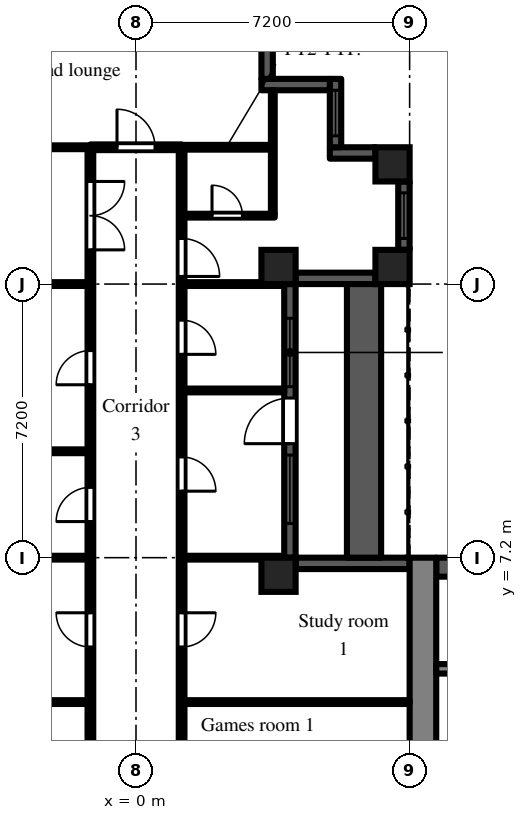
"""IFC4 building model, lengths in metres.
Left out: names, types, materials, properties, quantities, classifications, styles, units other than length and angle.
Written with IfcOpenShell. Run it as: python <this file> out.ifc"""

import sys

from ifc_helpers import new_model, si_unit, direction, frame, frame_2d, origin, origin_2d, place, context, subcontext, project, spatial, rectangle, extrude, element, fill, save


model = new_model("IFC4")
c1 = context("Model", 3, precision=1e-05, world=origin(), true_north=direction((0.0, 1.0)))
c2 = subcontext(c1, "Body", "Model", "MODEL_VIEW")
j1 = project(units=[si_unit("LENGTHUNIT", "METRE"), si_unit("PLANEANGLEUNIT", "RADIAN")], contexts=[c1])
p1 = place(None, origin())
s1 = spatial("IfcSite", under=j1, at=p1, CompositionType="ELEMENT")
p2 = place(p1, origin())
s2 = spatial("IfcBuilding", under=s1, at=p2, CompositionType="ELEMENT")
p3 = place(p2, frame((0.0, 0.0, 102.9)))
s3 = spatial("IfcBuildingStorey", under=s2, at=p3, CompositionType="ELEMENT", Elevation=102.9)
for number, where, z_axis, x_axis in (
    (1, (3.75, 6.75, 0.0), (0.0, 0.0, 1.0), (1.0, 0.0, 0.0)),
    (2, (3.75, 14.85, 0.0), (0.0, 0.0, 1.0), (1.0, 0.0, 0.0)),
    (3, (6.75, 14.85, 0.0), (0.0, 0.0, 1.0), (1.0, 0.0, 0.0)),
    (4, (6.75, 17.55, 0.0), (0.0, 0.0, 1.0), (1.0, 0.0, 0.0)),
):
    element("IfcColumn", number, at=place(p3, frame(where, z_axis=z_axis, x_axis=x_axis)), inside=s3, PredefinedType="COLUMN", context=c2, shape_type="SweptSolid", body=[
        extrude(rectangle(XDim=0.9, YDim=0.9, at=origin_2d()), origin(), (0.0, 0.0, 1.0), 3.0),
    ])
p4 = place(p3, frame((7.2, 7.05, 0.0), z_axis=(0.0, 0.0, 1.0), x_axis=(-1.0, 0.0, 0.0)))
e5 = element("IfcWall", 5, at=p4, inside=s3, PredefinedType="SOLIDWALL", context=c2, shape_type="SweptSolid", body=[
    extrude(rectangle(XDim=3.0, YDim=0.3, at=frame_2d((1.5, 0.0))), origin(), (0.0, 0.0, 1.0), 2.1),
])
p5 = place(p3, frame((4.05, 7.2, 0.0), z_axis=(0.0, 0.0, 1.0), x_axis=(0.0, 1.0, 0.0)))
e6 = element("IfcWall", 6, at=p5, inside=s3, PredefinedType="SOLIDWALL", context=c2, shape_type="SweptSolid", body=[
    extrude(rectangle(XDim=7.2, YDim=0.3, at=frame_2d((3.6, 0.0))), origin(), (0.0, 0.0, 1.0), 2.1),
])
p6 = place(p5, frame((3.0, 0.0, 0.0)))
e7 = element("IfcOpeningElement", 7, at=p6, cuts=e6, PredefinedType="OPENING", context=c2, shape_type="SweptSolid", body=[
    extrude(rectangle(XDim=1.2, YDim=2.05, at=frame_2d((0.6, 1.025))), frame((0.0, 0.16, 0.0), z_axis=(0.0, -1.0, 0.0), x_axis=(1.0, 0.0, 0.0)), (0.0, 0.0, 1.0), 0.32),
])
p7 = place(p5, frame((0.9, 0.0, 0.2)))
e8 = element("IfcOpeningElement", 8, at=p7, cuts=e6, PredefinedType="OPENING", context=c2, shape_type="SweptSolid", body=[
    extrude(rectangle(XDim=1.8, YDim=1.85, at=frame_2d((0.9, 0.925))), frame((0.0, 0.16, 0.0), z_axis=(0.0, -1.0, 0.0), x_axis=(1.0, 0.0, 0.0)), (0.0, 0.0, 1.0), 0.32),
])
p8 = place(p5, frame((4.5, 0.0, 0.2)))
e9 = element("IfcOpeningElement", 9, at=p8, cuts=e6, PredefinedType="OPENING", context=c2, shape_type="SweptSolid", body=[
    extrude(rectangle(XDim=1.8, YDim=1.85, at=frame_2d((0.9, 0.925))), frame((0.0, 0.16, 0.0), z_axis=(0.0, -1.0, 0.0), x_axis=(1.0, 0.0, 0.0)), (0.0, 0.0, 1.0), 0.32),
])
p9 = place(p3, frame((4.2, 14.55, 0.0), z_axis=(0.0, 0.0, 1.0), x_axis=(1.0, 0.0, 0.0)))
e10 = element("IfcWall", 10, at=p9, inside=s3, PredefinedType="SOLIDWALL", context=c2, shape_type="SweptSolid", body=[
    extrude(rectangle(XDim=2.1, YDim=0.3, at=frame_2d((1.05, 0.0))), origin(), (0.0, 0.0, 1.0), 2.1),
])
p10 = place(p3, frame((7.05, 15.3, 0.0), z_axis=(0.0, 0.0, 1.0), x_axis=(0.0, 1.0, 0.0)))
e11 = element("IfcWall", 11, at=p10, inside=s3, PredefinedType="SOLIDWALL", context=c2, shape_type="SweptSolid", body=[
    extrude(rectangle(XDim=1.8, YDim=0.3, at=frame_2d((0.9, 0.0))), origin(), (0.0, 0.0, 1.0), 2.1),
])
p11 = place(p10, frame((0.3, 0.0, 0.2)))
e12 = element("IfcOpeningElement", 12, at=p11, cuts=e11, PredefinedType="OPENING", context=c2, shape_type="SweptSolid", body=[
    extrude(rectangle(XDim=1.2, YDim=1.85, at=frame_2d((0.6, 0.925))), frame((0.0, 0.16, 0.0), z_axis=(0.0, -1.0, 0.0), x_axis=(1.0, 0.0, 0.0)), (0.0, 0.0, 1.0), 0.32),
])
p12 = place(p3, frame((6.3, 17.85, 0.0), z_axis=(0.0, 0.0, 1.0), x_axis=(-1.0, 0.0, 0.0)))
e13 = element("IfcWall", 13, at=p12, inside=s3, PredefinedType="SOLIDWALL", context=c2, shape_type="SweptSolid", body=[
    extrude(rectangle(XDim=1.2, YDim=0.3, at=frame_2d((0.6, 0.0))), origin(), (0.0, 0.0, 1.0), 2.575),
])
p13 = place(p3, frame((5.25, 18.0, 0.0), z_axis=(0.0, 0.0, 1.0), x_axis=(0.0, 1.0, 0.0)))
e14 = element("IfcWall", 14, at=p13, inside=s3, PredefinedType="SOLIDWALL", context=c2, shape_type="SweptSolid", body=[
    extrude(rectangle(XDim=1.8, YDim=0.3, at=frame_2d((0.9, 0.0))), origin(), (0.0, 0.0, 1.0), 2.575),
])
p14 = place(p13, frame((0.3, 0.0, 0.2)))
e15 = element("IfcOpeningElement", 15, at=p14, cuts=e14, PredefinedType="OPENING", context=c2, shape_type="SweptSolid", body=[
    extrude(rectangle(XDim=1.2, YDim=1.85, at=frame_2d((0.6, 0.925))), frame((0.0, 0.16, 0.0), z_axis=(0.0, -1.0, 0.0), x_axis=(1.0, 0.0, 0.0)), (0.0, 0.0, 1.0), 0.32),
])
p15 = place(p3, frame((5.1, 19.65, 0.0), z_axis=(0.0, 0.0, 1.0), x_axis=(-1.0, 0.0, 0.0)))
e16 = element("IfcWall", 16, at=p15, inside=s3, PredefinedType="SOLIDWALL", context=c2, shape_type="SweptSolid", body=[
    extrude(rectangle(XDim=1.8, YDim=0.3, at=frame_2d((0.9, 0.0))), origin(), (0.0, 0.0, 1.0), 2.575),
])
p16 = place(p3, frame((3.45, 19.8, 0.0), z_axis=(0.0, 0.0, 1.0), x_axis=(0.0, 1.0, 0.0)))
e17 = element("IfcWall", 17, at=p16, inside=s3, PredefinedType="SOLIDWALL", context=c2, shape_type="SweptSolid", body=[
    extrude(rectangle(XDim=0.9, YDim=0.3, at=frame_2d((0.45, 0.0))), origin(), (0.0, 0.0, 1.0), 2.575),
])
p17 = place(p3, frame((6.0, 7.2, 0.0), z_axis=(0.0, 0.0, 1.0), x_axis=(0.0, 1.0, 0.0)))
e18 = element("IfcWall", 18, at=p17, inside=s3, PredefinedType="PARAPET", context=c2, shape_type="SweptSolid", body=[
    extrude(rectangle(XDim=7.2, YDim=0.9, at=frame_2d((3.6, 0.0))), origin(), (0.0, 0.0, 1.0), 0.8),
])
p18 = place(p3, frame((7.55, -7.2, 0.0), z_axis=(0.0, 0.0, 1.0), x_axis=(0.0, 1.0, 0.0)))
e19 = element("IfcWall", 19, at=p18, inside=s3, PredefinedType="SHEAR", context=c2, shape_type="SweptSolid", body=[
    extrude(rectangle(XDim=14.4, YDim=0.7, at=frame_2d((7.2, 0.0))), origin(), (0.0, 0.0, 1.0), 2.575),
])
p19 = place(p18, frame((6.0, 0.0, 0.0)))
e20 = element("IfcOpeningElement", 20, at=p19, cuts=e19, PredefinedType="OPENING", context=c2, shape_type="SweptSolid", body=[
    extrude(rectangle(XDim=2.4, YDim=2.2, at=frame_2d((1.2, 1.1))), frame((0.0, 0.36, 0.0), z_axis=(0.0, -1.0, 0.0), x_axis=(1.0, 0.0, 0.0)), (0.0, 0.0, 1.0), 0.72),
])
p20 = place(p3, frame((7.9, 6.95, 0.0), z_axis=(0.0, 0.0, 1.0), x_axis=(1.0, 0.0, 0.0)))
e21 = element("IfcWall", 21, at=p20, inside=s3, PredefinedType="SHEAR", context=c2, shape_type="SweptSolid", body=[
    extrude(rectangle(XDim=12.95, YDim=0.5, at=frame_2d((6.475, 0.0))), origin(), (0.0, 0.0, 1.0), 2.575),
])
p21 = place(p3, frame((7.9, 4.275, 0.0), z_axis=(0.0, 0.0, 1.0), x_axis=(1.0, 0.0, 0.0)))
e22 = element("IfcWall", 22, at=p21, inside=s3, PredefinedType="SHEAR", context=c2, shape_type="SweptSolid", body=[
    extrude(rectangle(XDim=1.95, YDim=0.25, at=frame_2d((0.975, 0.0))), origin(), (0.0, 0.0, 1.0), 2.575),
])
p22 = place(p3, frame((-7.2, 3.4, 0.0), z_axis=(0.0, 0.0, 1.0), x_axis=(1.0, 0.0, 0.0)))
e23 = element("IfcWall", 23, at=p22, inside=s3, PredefinedType="PARTITIONING", context=c2, shape_type="SweptSolid", body=[
    extrude(rectangle(XDim=5.925, YDim=0.1, at=frame_2d((2.962, 0.0))), origin(), (0.0, 0.0, 1.0), 2.575),
])
for number, where, z_axis, x_axis in (
    (24, (-3.9, 7.2, 0.0), (0.0, 0.0, 1.0), (1.0, 0.0, 0.0)),
    (25, (-3.9, 10.0, 0.0), (0.0, 0.0, 1.0), (1.0, 0.0, 0.0)),
    (26, (-3.9, 14.4, 0.0), (0.0, 0.0, 1.0), (1.0, 0.0, 0.0)),
):
    element("IfcWall", number, at=place(p3, frame(where, z_axis=z_axis, x_axis=x_axis)), inside=s3, PredefinedType="PARTITIONING", context=c2, shape_type="SweptSolid", body=[
        extrude(rectangle(XDim=2.625, YDim=0.1, at=frame_2d((1.312, 0.0))), origin(), (0.0, 0.0, 1.0), 2.575),
    ])
p23 = place(p3, frame((-3.55, 18.0, 0.0), z_axis=(0.0, 0.0, 1.0), x_axis=(1.0, 0.0, 0.0)))
e27 = element("IfcWall", 27, at=p23, inside=s3, PredefinedType="PARTITIONING", context=c2, shape_type="SweptSolid", body=[
    extrude(rectangle(XDim=2.35, YDim=0.1, at=frame_2d((1.175, 0.0))), origin(), (0.0, 0.0, 1.0), 2.575),
])
p24 = place(p3, frame((-1.2, 1.275, 0.0), z_axis=(0.0, 0.0, 1.0), x_axis=(0.0, 1.0, 0.0)))
e28 = element("IfcWall", 28, at=p24, inside=s3, PredefinedType="PARTITIONING", context=c2, shape_type="SweptSolid", body=[
    extrude(rectangle(XDim=16.65, YDim=0.15, at=frame_2d((8.325, 0.0))), origin(), (0.0, 0.0, 1.0), 2.575),
])
p25 = place(p24, frame((3.575, 0.0, 0.0)))
e29 = element("IfcOpeningElement", 29, at=p25, cuts=e28, PredefinedType="OPENING", context=c2, shape_type="SweptSolid", body=[
    extrude(rectangle(XDim=0.9, YDim=2.1, at=frame_2d((0.45, 1.05))), frame((0.0, 0.085, 0.0), z_axis=(0.0, -1.0, 0.0), x_axis=(1.0, 0.0, 0.0)), (0.0, 0.0, 1.0), 0.17),
])
p26 = place(p24, frame((6.875, 0.0, 0.0)))
e30 = element("IfcOpeningElement", 30, at=p26, cuts=e28, PredefinedType="OPENING", context=c2, shape_type="SweptSolid", body=[
    extrude(rectangle(XDim=0.9, YDim=2.1, at=frame_2d((0.45, 1.05))), frame((0.0, 0.085, 0.0), z_axis=(0.0, -1.0, 0.0), x_axis=(1.0, 0.0, 0.0)), (0.0, 0.0, 1.0), 0.17),
])
p27 = place(p24, frame((10.475, 0.0, 0.0)))
e31 = element("IfcOpeningElement", 31, at=p27, cuts=e28, PredefinedType="OPENING", context=c2, shape_type="SweptSolid", body=[
    extrude(rectangle(XDim=0.9, YDim=2.1, at=frame_2d((0.45, 1.05))), frame((0.0, 0.085, 0.0), z_axis=(0.0, -1.0, 0.0), x_axis=(1.0, 0.0, 0.0)), (0.0, 0.0, 1.0), 0.17),
])
p28 = place(p24, frame((14.025, 0.0, 0.0)))
e32 = element("IfcOpeningElement", 32, at=p28, cuts=e28, PredefinedType="OPENING", context=c2, shape_type="SweptSolid", body=[
    extrude(rectangle(XDim=1.8, YDim=2.1, at=frame_2d((0.9, 1.05))), frame((0.0, 0.085, 0.0), z_axis=(0.0, -1.0, 0.0), x_axis=(1.0, 0.0, 0.0)), (0.0, 0.0, 1.0), 0.17),
])
p29 = place(p3, frame((-1.2, 18.0, 0.0), z_axis=(0.0, 0.0, 1.0), x_axis=(1.0, 0.0, 0.0)))
e33 = element("IfcWall", 33, at=p29, inside=s3, PredefinedType="PARTITIONING", context=c2, shape_type="SweptSolid", body=[
    extrude(rectangle(XDim=2.4, YDim=0.15, at=frame_2d((1.2, 0.0))), origin(), (0.0, 0.0, 1.0), 2.575),
])
p30 = place(p29, frame((0.7, 0.0, 0.0)))
e34 = element("IfcOpeningElement", 34, at=p30, cuts=e33, PredefinedType="OPENING", context=c2, shape_type="SweptSolid", body=[
    extrude(rectangle(XDim=1.0, YDim=2.1, at=frame_2d((0.5, 1.05))), frame((0.0, 0.085, 0.0), z_axis=(0.0, -1.0, 0.0), x_axis=(1.0, 0.0, 0.0)), (0.0, 0.0, 1.0), 0.17),
])
p31 = place(p3, frame((1.2, 1.125, 0.0), z_axis=(0.0, 0.0, 1.0), x_axis=(0.0, 1.0, 0.0)))
e35 = element("IfcWall", 35, at=p31, inside=s3, PredefinedType="PARTITIONING", context=c2, shape_type="SweptSolid", body=[
    extrude(rectangle(XDim=16.8, YDim=0.15, at=frame_2d((8.4, 0.0))), origin(), (0.0, 0.0, 1.0), 2.575),
])
p32 = place(p31, frame((3.725, 0.0, 0.0)))
e36 = element("IfcOpeningElement", 36, at=p32, cuts=e35, PredefinedType="OPENING", context=c2, shape_type="SweptSolid", body=[
    extrude(rectangle(XDim=0.9, YDim=2.1, at=frame_2d((0.45, 1.05))), frame((0.0, 0.085, 0.0), z_axis=(0.0, -1.0, 0.0), x_axis=(1.0, 0.0, 0.0)), (0.0, 0.0, 1.0), 0.17),
])
p33 = place(p31, frame((11.425, 0.0, 0.0)))
e37 = element("IfcOpeningElement", 37, at=p33, cuts=e35, PredefinedType="OPENING", context=c2, shape_type="SweptSolid", body=[
    extrude(rectangle(XDim=0.9, YDim=2.1, at=frame_2d((0.45, 1.05))), frame((0.0, 0.085, 0.0), z_axis=(0.0, -1.0, 0.0), x_axis=(1.0, 0.0, 0.0)), (0.0, 0.0, 1.0), 0.17),
])
p34 = place(p31, frame((7.825, 0.0, 0.0)))
e38 = element("IfcOpeningElement", 38, at=p34, cuts=e35, PredefinedType="OPENING", context=c2, shape_type="SweptSolid", body=[
    extrude(rectangle(XDim=0.9, YDim=2.1, at=frame_2d((0.45, 1.05))), frame((0.0, 0.085, 0.0), z_axis=(0.0, -1.0, 0.0), x_axis=(1.0, 0.0, 0.0)), (0.0, 0.0, 1.0), 0.17),
])
p35 = place(p31, frame((13.475, 0.0, 0.0)))
e39 = element("IfcOpeningElement", 39, at=p35, cuts=e35, PredefinedType="OPENING", context=c2, shape_type="SweptSolid", body=[
    extrude(rectangle(XDim=1.0, YDim=2.1, at=frame_2d((0.5, 1.05))), frame((0.0, 0.085, 0.0), z_axis=(0.0, -1.0, 0.0), x_axis=(1.0, 0.0, 0.0)), (0.0, 0.0, 1.0), 0.17),
])
p36 = place(p3, frame((1.275, 3.4, 0.0), z_axis=(0.0, 0.0, 1.0), x_axis=(1.0, 0.0, 0.0)))
e40 = element("IfcWall", 40, at=p36, inside=s3, PredefinedType="PARTITIONING", context=c2, shape_type="SweptSolid", body=[
    extrude(rectangle(XDim=5.925, YDim=0.1, at=frame_2d((2.962, 0.0))), origin(), (0.0, 0.0, 1.0), 2.575),
])
for number, where, z_axis, x_axis in (
    (41, (1.275, 7.2, 0.0), (0.0, 0.0, 1.0), (1.0, 0.0, 0.0)),
    (42, (1.275, 11.6, 0.0), (0.0, 0.0, 1.0), (1.0, 0.0, 0.0)),
    (43, (1.275, 14.4, 0.0), (0.0, 0.0, 1.0), (1.0, 0.0, 0.0)),
):
    element("IfcWall", number, at=place(p3, frame(where, z_axis=z_axis, x_axis=x_axis)), inside=s3, PredefinedType="PARTITIONING", context=c2, shape_type="SweptSolid", body=[
        extrude(rectangle(XDim=2.625, YDim=0.1, at=frame_2d((1.312, 0.0))), origin(), (0.0, 0.0, 1.0), 2.575),
    ])
p37 = place(p3, frame((1.275, 16.2, 0.0), z_axis=(0.0, 0.0, 1.0), x_axis=(1.0, 0.0, 0.0)))
e44 = element("IfcWall", 44, at=p37, inside=s3, PredefinedType="PARTITIONING", context=c2, shape_type="SweptSolid", body=[
    extrude(rectangle(XDim=2.375, YDim=0.1, at=frame_2d((1.188, 0.0))), origin(), (0.0, 0.0, 1.0), 2.575),
])
p38 = place(p37, frame((0.725, 0.0, 0.0)))
e45 = element("IfcOpeningElement", 45, at=p38, cuts=e44, PredefinedType="OPENING", context=c2, shape_type="SweptSolid", body=[
    extrude(rectangle(XDim=0.8, YDim=2.1, at=frame_2d((0.4, 1.05))), frame((0.0, 0.06, 0.0), z_axis=(0.0, -1.0, 0.0), x_axis=(1.0, 0.0, 0.0)), (0.0, 0.0, 1.0), 0.12),
])
p39 = place(p3, frame((1.2, 18.0, 0.0), z_axis=(0.0, 0.0, 1.0), x_axis=(1.0, 0.0, 0.0)))
e46 = element("IfcWall", 46, at=p39, inside=s3, PredefinedType="PARTITIONING", context=c2, shape_type="SweptSolid", body=[
    extrude(rectangle(XDim=2.35, YDim=0.125, at=frame_2d((1.175, 0.0))), origin(), (0.0, 0.0, 1.0), 2.575),
])
p40 = place(p3, frame((3.6, 16.25, 0.0), z_axis=(0.0, 0.0, 1.0), x_axis=(0.0, 1.0, 0.0)))
e47 = element("IfcWall", 47, at=p40, inside=s3, PredefinedType="PARTITIONING", context=c2, shape_type="SweptSolid", body=[
    extrude(rectangle(XDim=3.25, YDim=0.1, at=frame_2d((1.625, 0.0))), origin(), (0.0, 0.0, 1.0), 2.575),
])
p41 = place(p6, origin())
e48 = element("IfcDoor", 48, at=p41, inside=s3, OperationType="SINGLE_SWING_LEFT", PredefinedType="DOOR", context=c2, shape_type="SweptSolid", body=[
    extrude(rectangle(XDim=1.2, YDim=2.05, at=frame_2d((0.6, 1.025))), frame((0.0, 0.025, 0.0), z_axis=(0.0, -1.0, 0.0), x_axis=(1.0, 0.0, 0.0)), (0.0, 0.0, 1.0), 0.05),
])
fill(e7, e48)
p42 = place(p7, origin())
e49 = element("IfcWindow", 49, at=p42, inside=s3, PartitioningType="SINGLE_PANEL", PredefinedType="WINDOW", context=c2, shape_type="SweptSolid", body=[
    extrude(rectangle(XDim=1.8, YDim=1.85, at=frame_2d((0.9, 0.925))), frame((0.0, 0.03, 0.0), z_axis=(0.0, -1.0, 0.0), x_axis=(1.0, 0.0, 0.0)), (0.0, 0.0, 1.0), 0.06),
])
fill(e8, e49)
p43 = place(p8, origin())
e50 = element("IfcWindow", 50, at=p43, inside=s3, PartitioningType="SINGLE_PANEL", PredefinedType="WINDOW", context=c2, shape_type="SweptSolid", body=[
    extrude(rectangle(XDim=1.8, YDim=1.85, at=frame_2d((0.9, 0.925))), frame((0.0, 0.03, 0.0), z_axis=(0.0, -1.0, 0.0), x_axis=(1.0, 0.0, 0.0)), (0.0, 0.0, 1.0), 0.06),
])
fill(e9, e50)
p44 = place(p11, origin())
e51 = element("IfcWindow", 51, at=p44, inside=s3, PartitioningType="SINGLE_PANEL", PredefinedType="WINDOW", context=c2, shape_type="SweptSolid", body=[
    extrude(rectangle(XDim=1.2, YDim=1.85, at=frame_2d((0.6, 0.925))), frame((0.0, 0.03, 0.0), z_axis=(0.0, -1.0, 0.0), x_axis=(1.0, 0.0, 0.0)), (0.0, 0.0, 1.0), 0.06),
])
fill(e12, e51)
p45 = place(p14, origin())
e52 = element("IfcWindow", 52, at=p45, inside=s3, PartitioningType="SINGLE_PANEL", PredefinedType="WINDOW", context=c2, shape_type="SweptSolid", body=[
    extrude(rectangle(XDim=1.2, YDim=1.85, at=frame_2d((0.6, 0.925))), frame((0.0, 0.03, 0.0), z_axis=(0.0, -1.0, 0.0), x_axis=(1.0, 0.0, 0.0)), (0.0, 0.0, 1.0), 0.06),
])
fill(e15, e52)
p46 = place(p32, frame((0.9, 0.0, 0.0), z_axis=(0.0, 0.0, 1.0), x_axis=(-1.0, 0.0, 0.0)))
e53 = element("IfcDoor", 53, at=p46, inside=s3, OperationType="SINGLE_SWING_LEFT", PredefinedType="DOOR", context=c2, shape_type="SweptSolid", body=[
    extrude(rectangle(XDim=0.9, YDim=2.1, at=frame_2d((0.45, 1.05))), frame((0.0, 0.025, 0.0), z_axis=(0.0, -1.0, 0.0), x_axis=(1.0, 0.0, 0.0)), (0.0, 0.0, 1.0), 0.05),
])
fill(e36, e53)
p47 = place(p25, origin())
e54 = element("IfcDoor", 54, at=p47, inside=s3, OperationType="SINGLE_SWING_RIGHT", PredefinedType="DOOR", context=c2, shape_type="SweptSolid", body=[
    extrude(rectangle(XDim=0.9, YDim=2.1, at=frame_2d((0.45, 1.05))), frame((0.0, 0.025, 0.0), z_axis=(0.0, -1.0, 0.0), x_axis=(1.0, 0.0, 0.0)), (0.0, 0.0, 1.0), 0.05),
])
fill(e29, e54)
p48 = place(p30, origin())
e55 = element("IfcDoor", 55, at=p48, inside=s3, OperationType="SINGLE_SWING_LEFT", PredefinedType="DOOR", context=c2, shape_type="SweptSolid", body=[
    extrude(rectangle(XDim=1.0, YDim=2.1, at=frame_2d((0.5, 1.05))), frame((0.0, 0.025, 0.0), z_axis=(0.0, -1.0, 0.0), x_axis=(1.0, 0.0, 0.0)), (0.0, 0.0, 1.0), 0.05),
])
fill(e34, e55)
p49 = place(p26, origin())
e56 = element("IfcDoor", 56, at=p49, inside=s3, OperationType="SINGLE_SWING_LEFT", PredefinedType="DOOR", context=c2, shape_type="SweptSolid", body=[
    extrude(rectangle(XDim=0.9, YDim=2.1, at=frame_2d((0.45, 1.05))), frame((0.0, 0.025, 0.0), z_axis=(0.0, -1.0, 0.0), x_axis=(1.0, 0.0, 0.0)), (0.0, 0.0, 1.0), 0.05),
])
fill(e30, e56)
p50 = place(p27, origin())
e57 = element("IfcDoor", 57, at=p50, inside=s3, OperationType="SINGLE_SWING_LEFT", PredefinedType="DOOR", context=c2, shape_type="SweptSolid", body=[
    extrude(rectangle(XDim=0.9, YDim=2.1, at=frame_2d((0.45, 1.05))), frame((0.0, 0.025, 0.0), z_axis=(0.0, -1.0, 0.0), x_axis=(1.0, 0.0, 0.0)), (0.0, 0.0, 1.0), 0.05),
])
fill(e31, e57)
p51 = place(p28, frame((1.8, 0.0, 0.0), z_axis=(0.0, 0.0, 1.0), x_axis=(-1.0, 0.0, 0.0)))
e58 = element("IfcDoor", 58, at=p51, inside=s3, OperationType="DOUBLE_DOOR_DOUBLE_SWING", PredefinedType="DOOR", context=c2, shape_type="SweptSolid", body=[
    extrude(rectangle(XDim=1.8, YDim=2.1, at=frame_2d((0.9, 1.05))), frame((0.0, 0.025, 0.0), z_axis=(0.0, -1.0, 0.0), x_axis=(1.0, 0.0, 0.0)), (0.0, 0.0, 1.0), 0.05),
])
fill(e32, e58)
p52 = place(p33, frame((0.9, 0.0, 0.0), z_axis=(0.0, 0.0, 1.0), x_axis=(-1.0, 0.0, 0.0)))
e59 = element("IfcDoor", 59, at=p52, inside=s3, OperationType="SINGLE_SWING_RIGHT", PredefinedType="DOOR", context=c2, shape_type="SweptSolid", body=[
    extrude(rectangle(XDim=0.9, YDim=2.1, at=frame_2d((0.45, 1.05))), frame((0.0, 0.025, 0.0), z_axis=(0.0, -1.0, 0.0), x_axis=(1.0, 0.0, 0.0)), (0.0, 0.0, 1.0), 0.05),
])
fill(e37, e59)
p53 = place(p34, frame((0.9, 0.0, 0.0), z_axis=(0.0, 0.0, 1.0), x_axis=(-1.0, 0.0, 0.0)))
e60 = element("IfcDoor", 60, at=p53, inside=s3, OperationType="SINGLE_SWING_RIGHT", PredefinedType="DOOR", context=c2, shape_type="SweptSolid", body=[
    extrude(rectangle(XDim=0.9, YDim=2.1, at=frame_2d((0.45, 1.05))), frame((0.0, 0.025, 0.0), z_axis=(0.0, -1.0, 0.0), x_axis=(1.0, 0.0, 0.0)), (0.0, 0.0, 1.0), 0.05),
])
fill(e38, e60)
p54 = place(p38, origin())
e61 = element("IfcDoor", 61, at=p54, inside=s3, OperationType="SINGLE_SWING_LEFT", PredefinedType="DOOR", context=c2, shape_type="SweptSolid", body=[
    extrude(rectangle(XDim=0.8, YDim=2.1, at=frame_2d((0.4, 1.05))), frame((0.0, 0.025, 0.0), z_axis=(0.0, -1.0, 0.0), x_axis=(1.0, 0.0, 0.0)), (0.0, 0.0, 1.0), 0.05),
])
fill(e45, e61)
p55 = place(p35, frame((1.0, 0.0, 0.0), z_axis=(0.0, 0.0, 1.0), x_axis=(-1.0, 0.0, 0.0)))
e62 = element("IfcDoor", 62, at=p55, inside=s3, OperationType="SINGLE_SWING_RIGHT", PredefinedType="DOOR", context=c2, shape_type="SweptSolid", body=[
    extrude(rectangle(XDim=1.0, YDim=2.1, at=frame_2d((0.5, 1.05))), frame((0.0, 0.025, 0.0), z_axis=(0.0, -1.0, 0.0), x_axis=(1.0, 0.0, 0.0)), (0.0, 0.0, 1.0), 0.05),
])
fill(e39, e62)
save(model, sys.argv[1])
